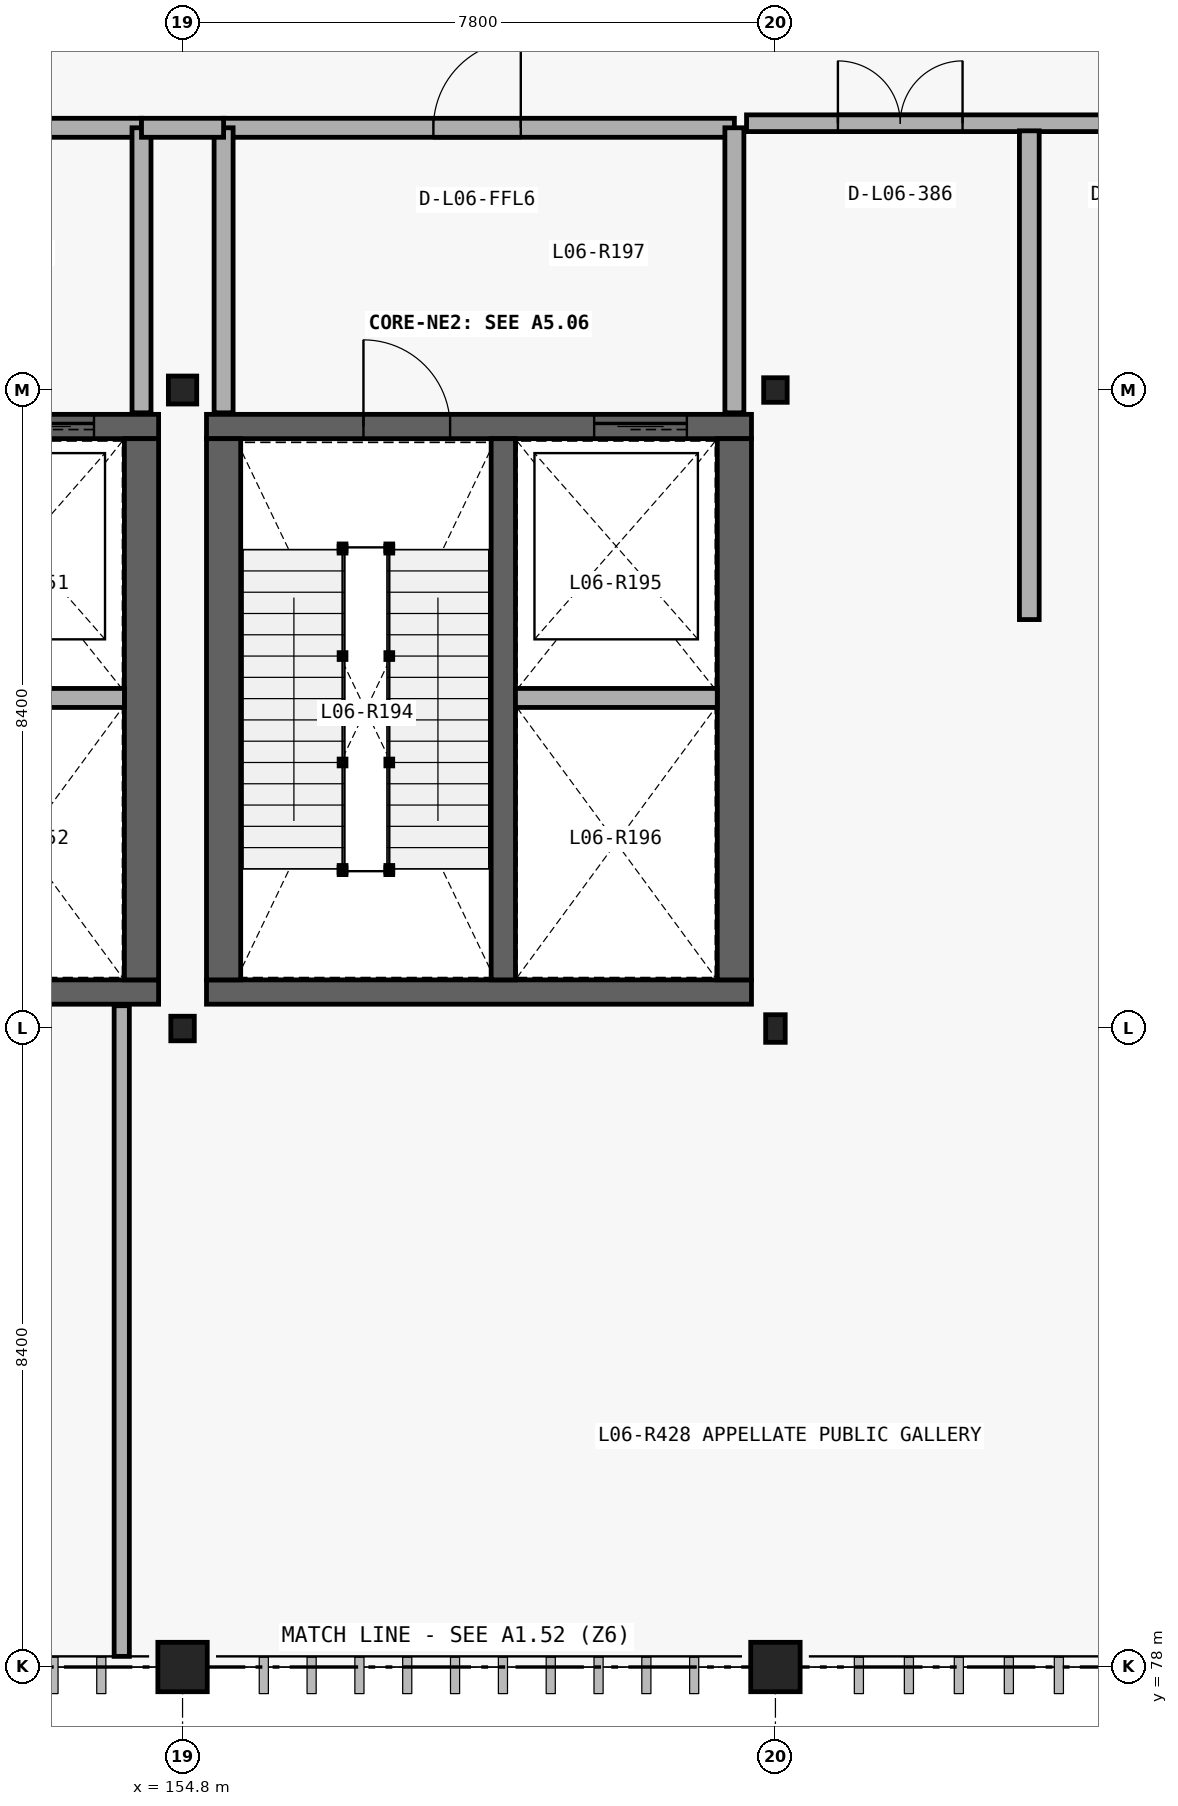
"""IFC4 building model, lengths in metres.
Left out: names, types, materials, properties, quantities, classifications, styles, units other than length and angle.
Written with IfcOpenShell. Run it as: python <this file> out.ifc"""

import sys

from ifc_helpers import new_model, si_unit, direction, frame, frame_2d, origin_with_axes, origin_2d_with_axis, place, context, subcontext, project, spatial, rectangle, circle, i_section, extrude, element, fill, save


model = new_model("IFC4")
c1 = context("Model", 3, precision=1e-05, world=origin_with_axes(), true_north=direction((0.0, 1.0)))
c2 = subcontext(c1, "Body", "Model", "MODEL_VIEW")
j1 = project(units=[si_unit("LENGTHUNIT", "METRE"), si_unit("PLANEANGLEUNIT", "RADIAN")], contexts=[c1])
p1 = place(None, origin_with_axes())
s1 = spatial("IfcSite", under=j1, at=p1, CompositionType="ELEMENT")
p2 = place(p1, origin_with_axes())
s2 = spatial("IfcBuilding", under=s1, at=p2, CompositionType="ELEMENT")
p3 = place(p2, frame((0.0, 0.0, 29.7), z_axis=(0.0, 0.0, 1.0), x_axis=(1.0, 0.0, 0.0)))
s3 = spatial("IfcBuildingStorey", under=s2, at=p3, CompositionType="ELEMENT", Elevation=29.7)
p4 = place(None, frame((147.315, 86.88, 29.7), z_axis=(0.0, 0.0, 1.0), x_axis=(1.0, 0.0, 0.0)))
e1 = element("IfcWall", 1, at=p4, inside=s3, PredefinedType="SHEAR", context=c2, shape_type="SweptSolid", body=[
    extrude(rectangle(XDim=7.17, YDim=0.32, at=frame_2d((3.585, 0.0), x_axis=(1.0, 0.0))), origin_with_axes(), (0.0, 0.0, 1.0), 4.8),
])
p5 = place(None, frame((154.485, 94.32, 29.7), z_axis=(0.0, 0.0, 1.0), x_axis=(-1.0, 0.0, 0.0)))
e2 = element("IfcWall", 2, at=p5, inside=s3, PredefinedType="SHEAR", context=c2, shape_type="SweptSolid", body=[
    extrude(rectangle(XDim=7.17, YDim=0.32, at=frame_2d((3.585, 0.0), x_axis=(1.0, 0.0))), origin_with_axes(), (0.0, 0.0, 1.0), 4.8),
])
p6 = place(None, frame((149.95, 94.32, 29.7), z_axis=(0.0, 0.0, 1.0), x_axis=(-1.0, 0.0, 0.0)))
e3 = element("IfcOpeningElement", 3, at=p6, cuts=e2, PredefinedType="OPENING", context=c2, shape_type="SweptSolid", body=[
    extrude(rectangle(XDim=1.14, YDim=2.18, at=frame_2d((0.0, 1.09), x_axis=(1.0, 0.0))), frame((0.0, 0.17, 0.0), z_axis=(0.0, -1.0, 0.0), x_axis=(1.0, 0.0, 0.0)), (0.0, 0.0, 1.0), 0.34),
])
p7 = place(None, frame((153.025, 94.32, 29.7), z_axis=(0.0, 0.0, 1.0), x_axis=(-1.0, 0.0, 0.0)))
e4 = element("IfcOpeningElement", 4, at=p7, cuts=e2, PredefinedType="OPENING", context=c2, shape_type="SweptSolid", body=[
    extrude(rectangle(XDim=1.22, YDim=2.28, at=frame_2d((0.0, 1.14), x_axis=(1.0, 0.0))), frame((0.0, 0.17, 0.0), z_axis=(0.0, -1.0, 0.0), x_axis=(1.0, 0.0, 0.0)), (0.0, 0.0, 1.0), 0.34),
])
p8 = place(None, frame((154.26, 87.04, 29.7), z_axis=(0.0, 0.0, 1.0), x_axis=(0.0, 1.0, 0.0)))
e5 = element("IfcWall", 5, at=p8, inside=s3, PredefinedType="SHEAR", context=c2, shape_type="SweptSolid", body=[
    extrude(rectangle(XDim=7.12, YDim=0.45, at=frame_2d((3.56, 0.0), x_axis=(1.0, 0.0))), origin_with_axes(), (0.0, 0.0, 1.0), 4.8),
])
p9 = place(None, frame((151.38, 90.749, 29.7), z_axis=(0.0, 0.0, 1.0), x_axis=(1.0, 0.0, 0.0)))
e6 = element("IfcWall", 6, at=p9, inside=s3, PredefinedType="PARTITIONING", context=c2, shape_type="SweptSolid", body=[
    extrude(rectangle(XDim=2.655, YDim=0.25, at=frame_2d((1.327, 0.0), x_axis=(1.0, 0.0))), origin_with_axes(), (0.0, 0.0, 1.0), 4.48),
])
p10 = place(None, frame((154.26, 98.25, 29.7), z_axis=(0.0, 0.0, 1.0), x_axis=(-1.0, 0.0, 0.0)))
e7 = element("IfcWall", 7, at=p10, inside=s3, PredefinedType="PARTITIONING", context=c2, shape_type="SweptSolid", body=[
    extrude(rectangle(XDim=6.72, YDim=0.25, at=frame_2d((3.36, 0.0), x_axis=(1.0, 0.0))), origin_with_axes(), (0.0, 0.0, 1.0), 4.48),
])
p11 = place(None, frame((150.875, 98.25, 29.7), z_axis=(0.0, 0.0, 1.0), x_axis=(-1.0, 0.0, 0.0)))
e8 = element("IfcOpeningElement", 8, at=p11, cuts=e7, PredefinedType="OPENING", context=c2, shape_type="SweptSolid", body=[
    extrude(rectangle(XDim=1.15, YDim=2.25, at=frame_2d((0.0, 1.125), x_axis=(1.0, 0.0))), frame((0.0, 0.135, 0.0), z_axis=(0.0, -1.0, 0.0), x_axis=(1.0, 0.0, 0.0)), (0.0, 0.0, 1.0), 0.27),
])
p12 = place(None, frame((154.26, 94.5, 29.7), z_axis=(0.0, 0.0, 1.0), x_axis=(0.0, 1.0, 0.0)))
e9 = element("IfcWall", 9, at=p12, inside=s3, PredefinedType="PARTITIONING", context=c2, shape_type="SweptSolid", body=[
    extrude(rectangle(XDim=3.75, YDim=0.25, at=frame_2d((1.875, 0.0), x_axis=(1.0, 0.0))), origin_with_axes(), (0.0, 0.0, 1.0), 4.48),
])
p13 = place(None, frame((155.115, 86.88, 29.7), z_axis=(0.0, 0.0, 1.0), x_axis=(1.0, 0.0, 0.0)))
e10 = element("IfcWall", 10, at=p13, inside=s3, PredefinedType="SHEAR", context=c2, shape_type="SweptSolid", body=[
    extrude(rectangle(XDim=7.17, YDim=0.32, at=frame_2d((3.585, 0.0), x_axis=(1.0, 0.0))), origin_with_axes(), (0.0, 0.0, 1.0), 4.8),
])
p14 = place(None, frame((162.285, 94.32, 29.7), z_axis=(0.0, 0.0, 1.0), x_axis=(-1.0, 0.0, 0.0)))
e11 = element("IfcWall", 11, at=p14, inside=s3, PredefinedType="SHEAR", context=c2, shape_type="SweptSolid", body=[
    extrude(rectangle(XDim=7.17, YDim=0.32, at=frame_2d((3.585, 0.0), x_axis=(1.0, 0.0))), origin_with_axes(), (0.0, 0.0, 1.0), 4.8),
])
p15 = place(None, frame((157.75, 94.32, 29.7), z_axis=(0.0, 0.0, 1.0), x_axis=(-1.0, 0.0, 0.0)))
e12 = element("IfcOpeningElement", 12, at=p15, cuts=e11, PredefinedType="OPENING", context=c2, shape_type="SweptSolid", body=[
    extrude(rectangle(XDim=1.14, YDim=2.18, at=frame_2d((0.0, 1.09), x_axis=(1.0, 0.0))), frame((0.0, 0.17, 0.0), z_axis=(0.0, -1.0, 0.0), x_axis=(1.0, 0.0, 0.0)), (0.0, 0.0, 1.0), 0.34),
])
p16 = place(None, frame((160.825, 94.32, 29.7), z_axis=(0.0, 0.0, 1.0), x_axis=(-1.0, 0.0, 0.0)))
e13 = element("IfcOpeningElement", 13, at=p16, cuts=e11, PredefinedType="OPENING", context=c2, shape_type="SweptSolid", body=[
    extrude(rectangle(XDim=1.22, YDim=2.28, at=frame_2d((0.0, 1.14), x_axis=(1.0, 0.0))), frame((0.0, 0.17, 0.0), z_axis=(0.0, -1.0, 0.0), x_axis=(1.0, 0.0, 0.0)), (0.0, 0.0, 1.0), 0.34),
])
for number, where, z_axis, x_axis in (
    (14, (162.06, 87.04, 29.7), (0.0, 0.0, 1.0), (0.0, 1.0, 0.0)),
    (15, (155.34, 94.16, 29.7), (0.0, 0.0, 1.0), (0.0, -1.0, 0.0)),
):
    element("IfcWall", number, at=place(None, frame(where, z_axis=z_axis, x_axis=x_axis)), inside=s3, PredefinedType="SHEAR", context=c2, shape_type="SweptSolid", body=[
        extrude(rectangle(XDim=7.12, YDim=0.45, at=frame_2d((3.56, 0.0), x_axis=(1.0, 0.0))), origin_with_axes(), (0.0, 0.0, 1.0), 4.8),
    ])
p17 = place(None, frame((159.02, 87.04, 29.7), z_axis=(0.0, 0.0, 1.0), x_axis=(0.0, 1.0, 0.0)))
e16 = element("IfcWall", 16, at=p17, inside=s3, PredefinedType="SHEAR", context=c2, shape_type="SweptSolid", body=[
    extrude(rectangle(XDim=7.12, YDim=0.32, at=frame_2d((3.56, 0.0), x_axis=(1.0, 0.0))), origin_with_axes(), (0.0, 0.0, 1.0), 4.8),
])
p18 = place(None, frame((159.18, 90.749, 29.7), z_axis=(0.0, 0.0, 1.0), x_axis=(1.0, 0.0, 0.0)))
e17 = element("IfcWall", 17, at=p18, inside=s3, PredefinedType="PARTITIONING", context=c2, shape_type="SweptSolid", body=[
    extrude(rectangle(XDim=2.655, YDim=0.25, at=frame_2d((1.327, 0.0), x_axis=(1.0, 0.0))), origin_with_axes(), (0.0, 0.0, 1.0), 4.48),
])
p19 = place(None, frame((162.06, 98.25, 29.7), z_axis=(0.0, 0.0, 1.0), x_axis=(-1.0, 0.0, 0.0)))
e18 = element("IfcWall", 18, at=p19, inside=s3, PredefinedType="PARTITIONING", context=c2, shape_type="SweptSolid", body=[
    extrude(rectangle(XDim=6.72, YDim=0.25, at=frame_2d((3.36, 0.0), x_axis=(1.0, 0.0))), origin_with_axes(), (0.0, 0.0, 1.0), 4.48),
])
p20 = place(None, frame((158.675, 98.25, 29.7), z_axis=(0.0, 0.0, 1.0), x_axis=(-1.0, 0.0, 0.0)))
e19 = element("IfcOpeningElement", 19, at=p20, cuts=e18, PredefinedType="OPENING", context=c2, shape_type="SweptSolid", body=[
    extrude(rectangle(XDim=1.15, YDim=2.25, at=frame_2d((0.0, 1.125), x_axis=(1.0, 0.0))), frame((0.0, 0.135, 0.0), z_axis=(0.0, -1.0, 0.0), x_axis=(1.0, 0.0, 0.0)), (0.0, 0.0, 1.0), 0.27),
])
for number, where, z_axis, x_axis in (
    (20, (155.34, 94.5, 29.7), (0.0, 0.0, 1.0), (0.0, 1.0, 0.0)),
    (21, (162.06, 94.5, 29.7), (0.0, 0.0, 1.0), (0.0, 1.0, 0.0)),
):
    element("IfcWall", number, at=place(None, frame(where, z_axis=z_axis, x_axis=x_axis)), inside=s3, PredefinedType="PARTITIONING", context=c2, shape_type="SweptSolid", body=[
        extrude(rectangle(XDim=3.75, YDim=0.25, at=frame_2d((1.875, 0.0), x_axis=(1.0, 0.0))), origin_with_axes(), (0.0, 0.0, 1.0), 4.48),
    ])
p21 = place(None, frame((154.26, 98.25, 29.7), z_axis=(0.0, 0.0, 1.0), x_axis=(1.0, 0.0, 0.0)))
e22 = element("IfcWall", 22, at=p21, inside=s3, PredefinedType="PARTITIONING", context=c2, shape_type="SweptSolid", body=[
    extrude(rectangle(XDim=1.08, YDim=0.25, at=frame_2d((0.54, 0.0), x_axis=(1.0, 0.0))), origin_with_axes(), (0.0, 0.0, 1.0), 4.48),
])
p22 = place(None, frame((162.22, 98.31, 29.7), z_axis=(0.0, 0.0, 1.0), x_axis=(1.0, 0.0, 0.0)))
e23 = element("IfcWall", 23, at=p22, inside=s3, PredefinedType="PARTITIONING", context=c2, shape_type="SweptSolid", body=[
    extrude(rectangle(XDim=7.04, YDim=0.22, at=frame_2d((3.52, 0.0), x_axis=(1.0, 0.0))), origin_with_axes(), (0.0, 0.0, 1.0), 4.48),
])
p23 = place(None, frame((164.242, 98.31, 29.7), z_axis=(0.0, 0.0, 1.0), x_axis=(1.0, 0.0, 0.0)))
e24 = element("IfcOpeningElement", 24, at=p23, cuts=e23, PredefinedType="OPENING", context=c2, shape_type="SweptSolid", body=[
    extrude(rectangle(XDim=1.64, YDim=2.42, at=frame_2d((0.0, 1.21), x_axis=(1.0, 0.0))), frame((0.0, 0.12, 0.0), z_axis=(0.0, -1.0, 0.0), x_axis=(1.0, 0.0, 0.0)), (0.0, 0.0, 1.0), 0.24),
])
p24 = place(None, frame((167.438, 98.31, 29.7), z_axis=(0.0, 0.0, 1.0), x_axis=(1.0, 0.0, 0.0)))
e25 = element("IfcOpeningElement", 25, at=p24, cuts=e23, PredefinedType="OPENING", context=c2, shape_type="SweptSolid", body=[
    extrude(rectangle(XDim=0.95, YDim=2.1, at=frame_2d((0.0, 1.05), x_axis=(1.0, 0.0))), frame((0.0, 0.12, 0.0), z_axis=(0.0, -1.0, 0.0), x_axis=(1.0, 0.0, 0.0)), (0.0, 0.0, 1.0), 0.24),
])
p25 = place(None, frame((165.94, 91.78, 29.7), z_axis=(0.0, 0.0, 1.0), x_axis=(0.0, 1.0, 0.0)))
e26 = element("IfcWall", 26, at=p25, inside=s3, PredefinedType="PLUMBINGWALL", context=c2, shape_type="SweptSolid", body=[
    extrude(rectangle(XDim=6.43, YDim=0.26, at=frame_2d((3.215, 0.0), x_axis=(1.0, 0.0))), origin_with_axes(), (0.0, 0.0, 1.0), 4.48),
])
p26 = place(None, frame((154.0, 78.14, 29.7), z_axis=(0.0, 0.0, 1.0), x_axis=(0.0, 1.0, 0.0)))
e27 = element("IfcWall", 27, at=p26, inside=s3, PredefinedType="PARTITIONING", context=c2, shape_type="SweptSolid", body=[
    extrude(rectangle(XDim=8.56, YDim=0.2, at=frame_2d((4.28, 0.0), x_axis=(1.0, 0.0))), origin_with_axes(), (0.0, 0.0, 1.0), 4.48),
])
p27 = place(None, frame((154.8, 78.0, 29.7), z_axis=(0.0, 0.0, 1.0), x_axis=(1.0, 0.0, 0.0)))
e28 = element("IfcColumn", 28, at=p27, inside=s3, PredefinedType="COLUMN", context=c2, shape_type="SweptSolid", body=[
    extrude(circle(Radius=0.325, at=origin_2d_with_axis()), origin_with_axes(), (0.0, 0.0, 1.0), 4.8),
])
p28 = place(None, frame((154.8, 86.4, 29.7), z_axis=(0.0, 0.0, 1.0), x_axis=(1.0, 0.0, 0.0)))
e29 = element("IfcColumn", 29, at=p28, inside=s3, PredefinedType="COLUMN", context=c2, shape_type="SweptSolid", body=[
    extrude(i_section(OverallWidth=0.309, OverallDepth=0.323, WebThickness=0.014, FlangeThickness=0.023, at=origin_2d_with_axis()), origin_with_axes(), (0.0, 0.0, 1.0), 4.8),
])
p29 = place(None, frame((154.8, 94.8, 29.7), z_axis=(0.0, 0.0, 1.0), x_axis=(1.0, 0.0, 0.0)))
e30 = element("IfcColumn", 30, at=p29, inside=s3, PredefinedType="COLUMN", context=c2, shape_type="SweptSolid", body=[
    extrude(i_section(OverallWidth=0.373, OverallDepth=0.368, WebThickness=0.015, FlangeThickness=0.024, at=origin_2d_with_axis()), origin_with_axes(), (0.0, 0.0, 1.0), 4.8),
])
p30 = place(None, frame((162.6, 78.0, 29.7), z_axis=(0.0, 0.0, 1.0), x_axis=(1.0, 0.0, 0.0)))
e31 = element("IfcColumn", 31, at=p30, inside=s3, PredefinedType="COLUMN", context=c2, shape_type="SweptSolid", body=[
    extrude(circle(Radius=0.325, at=origin_2d_with_axis()), origin_with_axes(), (0.0, 0.0, 1.0), 4.8),
])
p31 = place(None, frame((162.6, 86.4, 29.7), z_axis=(0.0, 0.0, 1.0), x_axis=(1.0, 0.0, 0.0)))
e32 = element("IfcColumn", 32, at=p31, inside=s3, PredefinedType="COLUMN", context=c2, shape_type="SweptSolid", body=[
    extrude(i_section(OverallWidth=0.257, OverallDepth=0.363, WebThickness=0.013, FlangeThickness=0.022, at=origin_2d_with_axis()), origin_with_axes(), (0.0, 0.0, 1.0), 4.8),
])
p32 = place(None, frame((162.6, 94.8, 29.7), z_axis=(0.0, 0.0, 1.0), x_axis=(1.0, 0.0, 0.0)))
e33 = element("IfcColumn", 33, at=p32, inside=s3, PredefinedType="COLUMN", context=c2, shape_type="SweptSolid", body=[
    extrude(i_section(OverallWidth=0.309, OverallDepth=0.323, WebThickness=0.014, FlangeThickness=0.023, at=origin_2d_with_axis()), origin_with_axes(), (0.0, 0.0, 1.0), 4.8),
])
p33 = place(None, frame((153.025, 94.32, 29.7), z_axis=(0.0, 0.0, 1.0), x_axis=(1.0, 0.0, 0.0)))
e34 = element("IfcDoor", 34, at=p33, inside=s3, OperationType="SLIDING_TO_LEFT", PredefinedType="DOOR", context=c2, shape_type="SweptSolid", body=[
    extrude(rectangle(XDim=1.22, YDim=2.28, at=frame_2d((0.0, 1.14), x_axis=(1.0, 0.0))), frame((0.0, 0.04, 0.0), z_axis=(0.0, -1.0, 0.0), x_axis=(1.0, 0.0, 0.0)), (0.0, 0.0, 1.0), 0.08),
])
fill(e4, e34)
p34 = place(None, frame((157.75, 94.32, 29.7), z_axis=(0.0, 0.0, 1.0), x_axis=(1.0, 0.0, 0.0)))
e35 = element("IfcDoor", 35, at=p34, inside=s3, OperationType="SINGLE_SWING_RIGHT", PredefinedType="DOOR", context=c2, shape_type="SweptSolid", body=[
    extrude(rectangle(XDim=1.14, YDim=2.18, at=frame_2d((0.0, 1.09), x_axis=(1.0, 0.0))), frame((0.0, 0.04, 0.0), z_axis=(0.0, -1.0, 0.0), x_axis=(1.0, 0.0, 0.0)), (0.0, 0.0, 1.0), 0.08),
])
fill(e12, e35)
p35 = place(None, frame((160.825, 94.32, 29.7), z_axis=(0.0, 0.0, 1.0), x_axis=(1.0, 0.0, 0.0)))
e36 = element("IfcDoor", 36, at=p35, inside=s3, OperationType="SLIDING_TO_LEFT", PredefinedType="DOOR", context=c2, shape_type="SweptSolid", body=[
    extrude(rectangle(XDim=1.22, YDim=2.28, at=frame_2d((0.0, 1.14), x_axis=(1.0, 0.0))), frame((0.0, 0.04, 0.0), z_axis=(0.0, -1.0, 0.0), x_axis=(1.0, 0.0, 0.0)), (0.0, 0.0, 1.0), 0.08),
])
fill(e13, e36)
p36 = place(None, frame((158.675, 98.25, 29.7), z_axis=(0.0, 0.0, 1.0), x_axis=(1.0, 0.0, 0.0)))
e37 = element("IfcDoor", 37, at=p36, inside=s3, OperationType="SINGLE_SWING_LEFT", PredefinedType="DOOR", context=c2, shape_type="SweptSolid", body=[
    extrude(rectangle(XDim=1.15, YDim=2.25, at=frame_2d((0.0, 1.125), x_axis=(1.0, 0.0))), frame((0.0, 0.04, 0.0), z_axis=(0.0, -1.0, 0.0), x_axis=(1.0, 0.0, 0.0)), (0.0, 0.0, 1.0), 0.08),
])
fill(e19, e37)
p37 = place(None, frame((164.242, 98.31, 29.7), z_axis=(0.0, 0.0, 1.0), x_axis=(1.0, 0.0, 0.0)))
e38 = element("IfcDoor", 38, at=p37, inside=s3, OperationType="DOUBLE_DOOR_SINGLE_SWING", PredefinedType="DOOR", context=c2, shape_type="SweptSolid", body=[
    extrude(rectangle(XDim=1.64, YDim=2.42, at=frame_2d((0.0, 1.21), x_axis=(1.0, 0.0))), frame((0.0, 0.04, 0.0), z_axis=(0.0, -1.0, 0.0), x_axis=(1.0, 0.0, 0.0)), (0.0, 0.0, 1.0), 0.08),
])
fill(e24, e38)
save(model, sys.argv[1])
